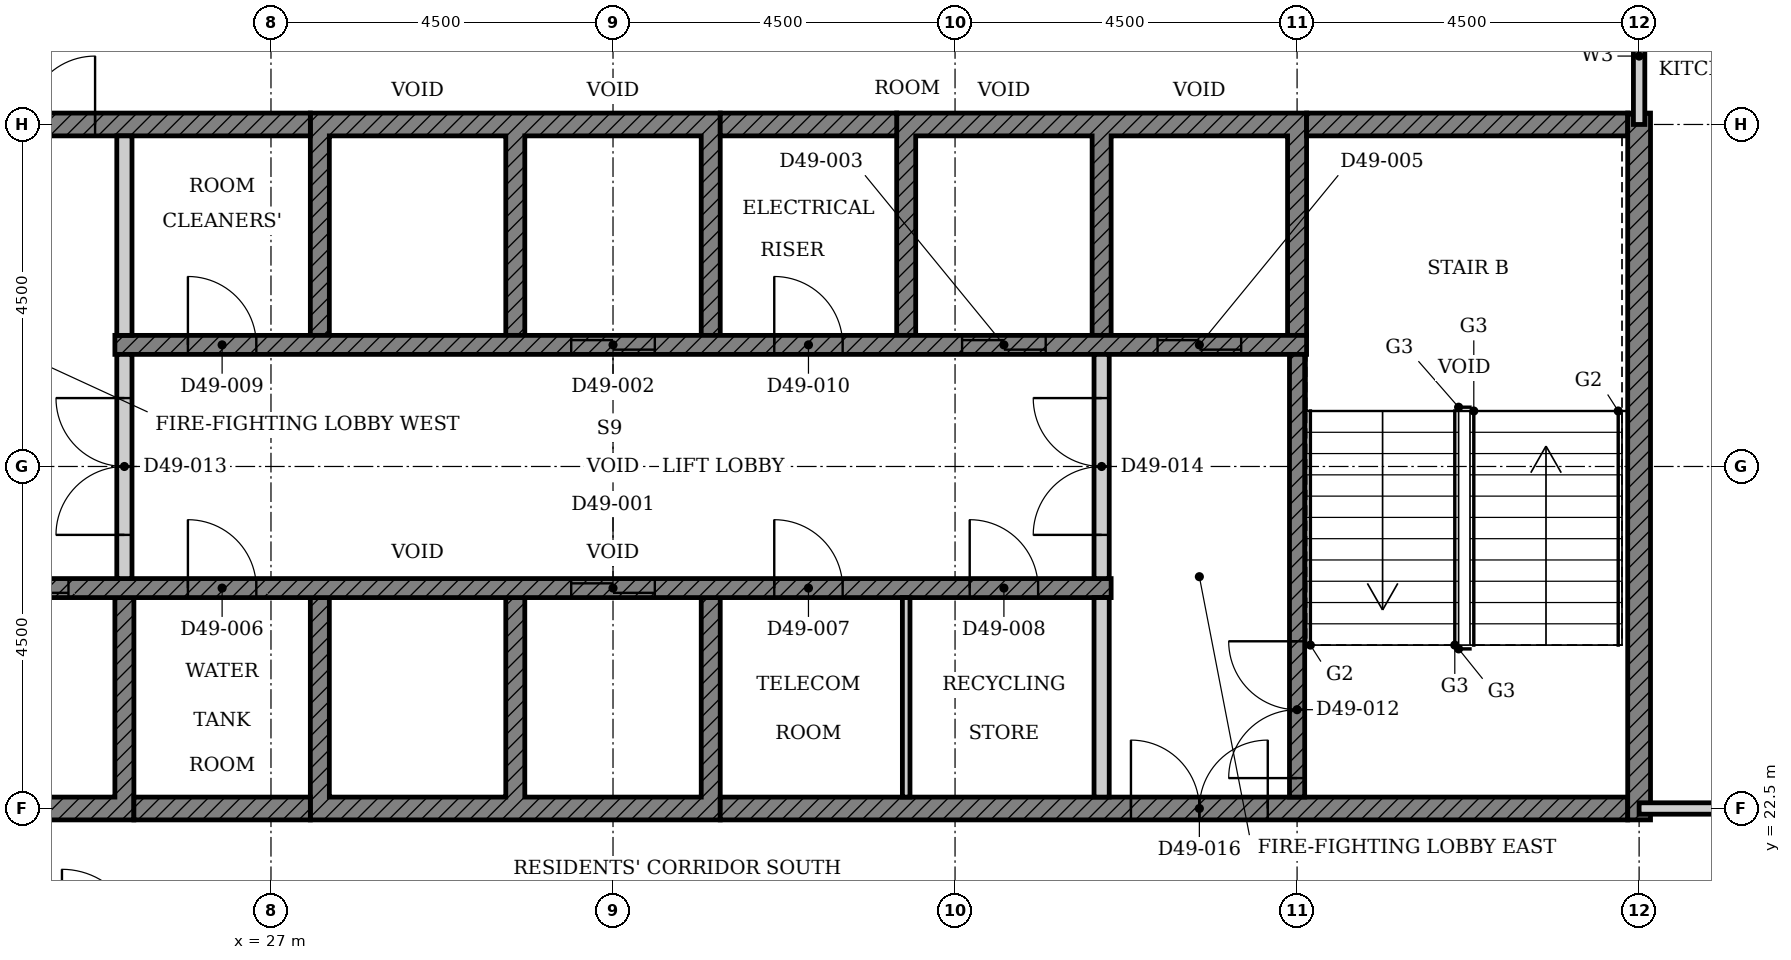
"""IFC4 building model, lengths in metres.
Left out: names, types, materials, properties, quantities, classifications, styles, units other than length and angle.
Written with IfcOpenShell. Run it as: python <this file> out.ifc"""

import sys

from ifc_helpers import new_model, si_unit, direction, frame, frame_2d, origin, place, context, subcontext, project, spatial, polyline, rectangle, outline, extrude, element, fill, save


model = new_model("IFC4")
c1 = context("Model", 3, precision=1e-05, world=origin(), true_north=direction((0.0, 1.0)))
c2 = subcontext(c1, "Body", "Model", "MODEL_VIEW")
j1 = project(units=[si_unit("LENGTHUNIT", "METRE"), si_unit("PLANEANGLEUNIT", "RADIAN")], contexts=[c1])
p1 = place(None, origin())
s1 = spatial("IfcSite", under=j1, at=p1, CompositionType="ELEMENT")
p2 = place(p1, origin())
s2 = spatial("IfcBuilding", under=s1, at=p2, CompositionType="ELEMENT")
p3 = place(p2, frame((0.0, 0.0, 196.1)))
s3 = spatial("IfcBuildingStorey", under=s2, at=p3, CompositionType="ELEMENT", Elevation=196.1)
p4 = place(p3, origin())
e1 = element("IfcWall", 1, at=p4, inside=s3, PredefinedType="SHEAR", context=c2, shape_type="SweptSolid", body=[
    extrude(outline(polyline([(22.375, 22.35), (25.197, 22.35), (25.197, 25.275), (24.947, 25.275), (24.947, 22.65), (22.625, 22.65), (22.625, 25.275), (22.375, 25.275), (22.375, 22.35)])), origin(), (0.0, 0.0, 1.0), 3.4),
])
p5 = place(p3, origin())
e2 = element("IfcWall", 2, at=p5, inside=s3, PredefinedType="SHEAR", context=c2, shape_type="SweptSolid", body=[
    extrude(outline(polyline([(27.518, 22.35), (32.911, 22.35), (32.911, 25.275), (32.661, 25.275), (32.661, 22.65), (30.339, 22.65), (30.339, 25.275), (30.089, 25.275), (30.089, 22.65), (27.768, 22.65), (27.768, 25.275), (27.518, 25.275), (27.518, 22.35)])), origin(), (0.0, 0.0, 1.0), 3.4),
])
p6 = place(p3, origin())
e3 = element("IfcWall", 3, at=p6, inside=s3, PredefinedType="SHEAR", context=c2, shape_type="SweptSolid", body=[
    extrude(outline(polyline([(27.518, 28.725), (27.768, 28.725), (27.768, 31.35), (30.089, 31.35), (30.089, 28.725), (30.339, 28.725), (30.339, 31.35), (32.661, 31.35), (32.661, 28.725), (32.911, 28.725), (32.911, 31.65), (27.518, 31.65), (27.518, 28.725)])), origin(), (0.0, 0.0, 1.0), 3.4),
])
p7 = place(p3, origin())
e4 = element("IfcWall", 4, at=p7, inside=s3, PredefinedType="SHEAR", context=c2, shape_type="SweptSolid", body=[
    extrude(outline(polyline([(35.232, 28.725), (35.482, 28.725), (35.482, 31.35), (37.803, 31.35), (37.803, 28.725), (38.053, 28.725), (38.053, 31.35), (40.375, 31.35), (40.375, 28.725), (40.625, 28.725), (40.625, 31.65), (35.232, 31.65), (35.232, 28.725)])), origin(), (0.0, 0.0, 1.0), 3.4),
])
p8 = place(p3, frame((25.197, 22.5, 0.0), z_axis=(0.0, 0.0, 1.0), x_axis=(1.0, 0.0, 0.0)))
e5 = element("IfcWall", 5, at=p8, inside=s3, PredefinedType="SHEAR", context=c2, shape_type="SweptSolid", body=[
    extrude(rectangle(XDim=2.321, YDim=0.3, at=frame_2d((1.161, 0.0))), origin(), (0.0, 0.0, 1.0), 3.4),
])
p9 = place(p3, frame((32.911, 22.5, 0.0), z_axis=(0.0, 0.0, 1.0), x_axis=(1.0, 0.0, 0.0)))
e6 = element("IfcWall", 6, at=p9, inside=s3, PredefinedType="SHEAR", context=c2, shape_type="SweptSolid", body=[
    extrude(rectangle(XDim=11.939, YDim=0.3, at=frame_2d((5.97, 0.0))), origin(), (0.0, 0.0, 1.0), 3.4),
])
p10 = place(p9, frame((5.404, 0.0, 0.0)))
e7 = element("IfcOpeningElement", 7, at=p10, cuts=e6, PredefinedType="OPENING", context=c2, shape_type="SweptSolid", body=[
    extrude(rectangle(XDim=1.8, YDim=2.1, at=frame_2d((0.9, 1.05))), frame((0.0, 0.16, 0.0), z_axis=(0.0, -1.0, 0.0), x_axis=(1.0, 0.0, 0.0)), (0.0, 0.0, 1.0), 0.32),
])
p11 = place(p3, frame((18.15, 31.5, 0.0), z_axis=(0.0, 0.0, 1.0), x_axis=(1.0, 0.0, 0.0)))
e8 = element("IfcWall", 8, at=p11, inside=s3, PredefinedType="SHEAR", context=c2, shape_type="SweptSolid", body=[
    extrude(rectangle(XDim=9.368, YDim=0.3, at=frame_2d((4.684, 0.0))), origin(), (0.0, 0.0, 1.0), 3.4),
])
p12 = place(p11, frame((4.736, 0.0, 0.0)))
e9 = element("IfcOpeningElement", 9, at=p12, cuts=e8, PredefinedType="OPENING", context=c2, shape_type="SweptSolid", body=[
    extrude(rectangle(XDim=1.8, YDim=2.1, at=frame_2d((0.9, 1.05))), frame((0.0, 0.16, 0.0), z_axis=(0.0, -1.0, 0.0), x_axis=(1.0, 0.0, 0.0)), (0.0, 0.0, 1.0), 0.32),
])
p13 = place(p3, frame((32.911, 31.5, 0.0), z_axis=(0.0, 0.0, 1.0), x_axis=(1.0, 0.0, 0.0)))
e10 = element("IfcWall", 10, at=p13, inside=s3, PredefinedType="SHEAR", context=c2, shape_type="SweptSolid", body=[
    extrude(rectangle(XDim=2.322, YDim=0.3, at=frame_2d((1.161, 0.0))), origin(), (0.0, 0.0, 1.0), 3.4),
])
p14 = place(p3, frame((40.625, 31.5, 0.0), z_axis=(0.0, 0.0, 1.0), x_axis=(1.0, 0.0, 0.0)))
e11 = element("IfcWall", 11, at=p14, inside=s3, PredefinedType="SHEAR", context=c2, shape_type="SweptSolid", body=[
    extrude(rectangle(XDim=4.225, YDim=0.3, at=frame_2d((2.113, 0.0))), origin(), (0.0, 0.0, 1.0), 3.4),
])
p15 = place(p3, frame((45.0, 22.35, 0.0), z_axis=(0.0, 0.0, 1.0), x_axis=(0.0, 1.0, 0.0)))
e12 = element("IfcWall", 12, at=p15, inside=s3, PredefinedType="SHEAR", context=c2, shape_type="SweptSolid", body=[
    extrude(rectangle(XDim=9.3, YDim=0.3, at=frame_2d((4.65, 0.0))), origin(), (0.0, 0.0, 1.0), 3.4),
])
p16 = place(p3, frame((22.375, 25.4, 0.0), z_axis=(0.0, 0.0, 1.0), x_axis=(1.0, 0.0, 0.0)))
e13 = element("IfcWall", 13, at=p16, inside=s3, PredefinedType="SHEAR", context=c2, shape_type="SweptSolid", body=[
    extrude(rectangle(XDim=15.678, YDim=0.25, at=frame_2d((7.839, 0.0))), origin(), (0.0, 0.0, 1.0), 3.4),
])
p17 = place(p16, frame((8.575, 0.0, 0.0)))
e14 = element("IfcOpeningElement", 14, at=p17, cuts=e13, PredefinedType="OPENING", context=c2, shape_type="SweptSolid", body=[
    extrude(rectangle(XDim=1.1, YDim=2.1, at=frame_2d((0.55, 1.05))), frame((0.0, 0.135, 0.0), z_axis=(0.0, -1.0, 0.0), x_axis=(1.0, 0.0, 0.0)), (0.0, 0.0, 1.0), 0.27),
])
p18 = place(p16, frame((0.861, 0.0, 0.0)))
e15 = element("IfcOpeningElement", 15, at=p18, cuts=e13, PredefinedType="OPENING", context=c2, shape_type="SweptSolid", body=[
    extrude(rectangle(XDim=1.1, YDim=2.1, at=frame_2d((0.55, 1.05))), frame((0.0, 0.135, 0.0), z_axis=(0.0, -1.0, 0.0), x_axis=(1.0, 0.0, 0.0)), (0.0, 0.0, 1.0), 0.27),
])
p19 = place(p16, frame((3.532, 0.0, 0.0)))
e16 = element("IfcOpeningElement", 16, at=p19, cuts=e13, PredefinedType="OPENING", context=c2, shape_type="SweptSolid", body=[
    extrude(rectangle(XDim=0.9, YDim=2.1, at=frame_2d((0.45, 1.05))), frame((0.0, 0.135, 0.0), z_axis=(0.0, -1.0, 0.0), x_axis=(1.0, 0.0, 0.0)), (0.0, 0.0, 1.0), 0.27),
])
p20 = place(p16, frame((11.246, 0.0, 0.0)))
e17 = element("IfcOpeningElement", 17, at=p20, cuts=e13, PredefinedType="OPENING", context=c2, shape_type="SweptSolid", body=[
    extrude(rectangle(XDim=0.9, YDim=2.1, at=frame_2d((0.45, 1.05))), frame((0.0, 0.135, 0.0), z_axis=(0.0, -1.0, 0.0), x_axis=(1.0, 0.0, 0.0)), (0.0, 0.0, 1.0), 0.27),
])
p21 = place(p16, frame((13.818, 0.0, 0.0)))
e18 = element("IfcOpeningElement", 18, at=p21, cuts=e13, PredefinedType="OPENING", context=c2, shape_type="SweptSolid", body=[
    extrude(rectangle(XDim=0.9, YDim=2.1, at=frame_2d((0.45, 1.05))), frame((0.0, 0.135, 0.0), z_axis=(0.0, -1.0, 0.0), x_axis=(1.0, 0.0, 0.0)), (0.0, 0.0, 1.0), 0.27),
])
p22 = place(p3, frame((24.947, 28.6, 0.0), z_axis=(0.0, 0.0, 1.0), x_axis=(1.0, 0.0, 0.0)))
e19 = element("IfcWall", 19, at=p22, inside=s3, PredefinedType="SHEAR", context=c2, shape_type="SweptSolid", body=[
    extrude(rectangle(XDim=15.678, YDim=0.25, at=frame_2d((7.839, 0.0))), origin(), (0.0, 0.0, 1.0), 3.4),
])
p23 = place(p22, frame((6.004, 0.0, 0.0)))
e20 = element("IfcOpeningElement", 20, at=p23, cuts=e19, PredefinedType="OPENING", context=c2, shape_type="SweptSolid", body=[
    extrude(rectangle(XDim=1.1, YDim=2.1, at=frame_2d((0.55, 1.05))), frame((0.0, 0.135, 0.0), z_axis=(0.0, -1.0, 0.0), x_axis=(1.0, 0.0, 0.0)), (0.0, 0.0, 1.0), 0.27),
])
p24 = place(p22, frame((11.146, 0.0, 0.0)))
e21 = element("IfcOpeningElement", 21, at=p24, cuts=e19, PredefinedType="OPENING", context=c2, shape_type="SweptSolid", body=[
    extrude(rectangle(XDim=1.1, YDim=2.1, at=frame_2d((0.55, 1.05))), frame((0.0, 0.135, 0.0), z_axis=(0.0, -1.0, 0.0), x_axis=(1.0, 0.0, 0.0)), (0.0, 0.0, 1.0), 0.27),
])
p25 = place(p22, frame((13.718, 0.0, 0.0)))
e22 = element("IfcOpeningElement", 22, at=p25, cuts=e19, PredefinedType="OPENING", context=c2, shape_type="SweptSolid", body=[
    extrude(rectangle(XDim=1.1, YDim=2.1, at=frame_2d((0.55, 1.05))), frame((0.0, 0.135, 0.0), z_axis=(0.0, -1.0, 0.0), x_axis=(1.0, 0.0, 0.0)), (0.0, 0.0, 1.0), 0.27),
])
p26 = place(p22, frame((0.961, 0.0, 0.0)))
e23 = element("IfcOpeningElement", 23, at=p26, cuts=e19, PredefinedType="OPENING", context=c2, shape_type="SweptSolid", body=[
    extrude(rectangle(XDim=0.9, YDim=2.1, at=frame_2d((0.45, 1.05))), frame((0.0, 0.135, 0.0), z_axis=(0.0, -1.0, 0.0), x_axis=(1.0, 0.0, 0.0)), (0.0, 0.0, 1.0), 0.27),
])
p27 = place(p22, frame((8.675, 0.0, 0.0)))
e24 = element("IfcOpeningElement", 24, at=p27, cuts=e19, PredefinedType="OPENING", context=c2, shape_type="SweptSolid", body=[
    extrude(rectangle(XDim=0.9, YDim=2.1, at=frame_2d((0.45, 1.05))), frame((0.0, 0.135, 0.0), z_axis=(0.0, -1.0, 0.0), x_axis=(1.0, 0.0, 0.0)), (0.0, 0.0, 1.0), 0.27),
])
p28 = place(p3, frame((37.928, 22.65, 0.0), z_axis=(0.0, 0.0, 1.0), x_axis=(0.0, 1.0, 0.0)))
e25 = element("IfcWall", 25, at=p28, inside=s3, PredefinedType="PARTITIONING", context=c2, shape_type="SweptSolid", body=[
    extrude(rectangle(XDim=2.625, YDim=0.2, at=frame_2d((1.312, 0.0))), origin(), (0.0, 0.0, 1.0), 3.4),
])
p29 = place(p3, frame((35.357, 22.65, 0.0), z_axis=(0.0, 0.0, 1.0), x_axis=(0.0, 1.0, 0.0)))
e26 = element("IfcWall", 26, at=p29, inside=s3, PredefinedType="PARTITIONING", context=c2, shape_type="SweptSolid", body=[
    extrude(rectangle(XDim=2.625, YDim=0.1, at=frame_2d((1.312, 0.0))), origin(), (0.0, 0.0, 1.0), 3.4),
])
p30 = place(p3, frame((25.072, 28.725, 0.0), z_axis=(0.0, 0.0, 1.0), x_axis=(0.0, 1.0, 0.0)))
e27 = element("IfcWall", 27, at=p30, inside=s3, PredefinedType="PARTITIONING", context=c2, shape_type="SweptSolid", body=[
    extrude(rectangle(XDim=2.625, YDim=0.2, at=frame_2d((1.312, 0.0))), origin(), (0.0, 0.0, 1.0), 3.4),
])
p31 = place(p3, frame((40.5, 22.65, 0.0), z_axis=(0.0, 0.0, 1.0), x_axis=(0.0, 1.0, 0.0)))
e28 = element("IfcWall", 28, at=p31, inside=s3, PredefinedType="SHEAR", context=c2, shape_type="SweptSolid", body=[
    extrude(rectangle(XDim=5.825, YDim=0.2, at=frame_2d((2.913, 0.0))), origin(), (0.0, 0.0, 1.0), 3.4),
])
p32 = place(p31, frame((0.25, 0.0, 0.0)))
e29 = element("IfcOpeningElement", 29, at=p32, cuts=e28, PredefinedType="OPENING", context=c2, shape_type="SweptSolid", body=[
    extrude(rectangle(XDim=1.8, YDim=2.1, at=frame_2d((0.9, 1.05))), frame((0.0, 0.11, 0.0), z_axis=(0.0, -1.0, 0.0), x_axis=(1.0, 0.0, 0.0)), (0.0, 0.0, 1.0), 0.22),
])
p33 = place(p3, frame((25.072, 25.525, 0.0), z_axis=(0.0, 0.0, 1.0), x_axis=(0.0, 1.0, 0.0)))
e30 = element("IfcWall", 30, at=p33, inside=s3, PredefinedType="PARTITIONING", context=c2, shape_type="SweptSolid", body=[
    extrude(rectangle(XDim=2.95, YDim=0.2, at=frame_2d((1.475, 0.0))), origin(), (0.0, 0.0, 1.0), 3.4),
])
p34 = place(p33, frame((0.575, 0.0, 0.0)))
e31 = element("IfcOpeningElement", 31, at=p34, cuts=e30, PredefinedType="OPENING", context=c2, shape_type="SweptSolid", body=[
    extrude(rectangle(XDim=1.8, YDim=2.1, at=frame_2d((0.9, 1.05))), frame((0.0, 0.11, 0.0), z_axis=(0.0, -1.0, 0.0), x_axis=(1.0, 0.0, 0.0)), (0.0, 0.0, 1.0), 0.22),
])
p35 = place(p3, frame((37.928, 25.525, 0.0), z_axis=(0.0, 0.0, 1.0), x_axis=(0.0, 1.0, 0.0)))
e32 = element("IfcWall", 32, at=p35, inside=s3, PredefinedType="PARTITIONING", context=c2, shape_type="SweptSolid", body=[
    extrude(rectangle(XDim=2.95, YDim=0.2, at=frame_2d((1.475, 0.0))), origin(), (0.0, 0.0, 1.0), 3.4),
])
p36 = place(p35, frame((0.575, 0.0, 0.0)))
e33 = element("IfcOpeningElement", 33, at=p36, cuts=e32, PredefinedType="OPENING", context=c2, shape_type="SweptSolid", body=[
    extrude(rectangle(XDim=1.8, YDim=2.1, at=frame_2d((0.9, 1.05))), frame((0.0, 0.11, 0.0), z_axis=(0.0, -1.0, 0.0), x_axis=(1.0, 0.0, 0.0)), (0.0, 0.0, 1.0), 0.22),
])
p37 = place(p3, frame((45.0, 22.5, 0.0), z_axis=(0.0, 0.0, 1.0), x_axis=(1.0, 0.0, 0.0)))
e34 = element("IfcWall", 34, at=p37, inside=s3, PredefinedType="PARTITIONING", context=c2, shape_type="SweptSolid", body=[
    extrude(rectangle(XDim=4.79, YDim=0.15, at=frame_2d((2.395, 0.0))), origin(), (0.0, 0.0, 1.0), 3.4),
])
p38 = place(p37, frame((1.75, 0.0, 0.0)))
e35 = element("IfcOpeningElement", 35, at=p38, cuts=e34, PredefinedType="OPENING", context=c2, shape_type="SweptSolid", body=[
    extrude(rectangle(XDim=1.0, YDim=2.2, at=frame_2d((0.5, 1.1))), frame((0.0, 0.085, 0.0), z_axis=(0.0, -1.0, 0.0), x_axis=(1.0, 0.0, 0.0)), (0.0, 0.0, 1.0), 0.17),
])
p39 = place(p3, frame((45.0, 31.5, 0.0), z_axis=(0.0, 0.0, 1.0), x_axis=(0.0, 1.0, 0.0)))
e36 = element("IfcWall", 36, at=p39, inside=s3, PredefinedType="PARTITIONING", context=c2, shape_type="SweptSolid", body=[
    extrude(rectangle(XDim=1.8, YDim=0.15, at=frame_2d((0.9, 0.0))), origin(), (0.0, 0.0, 1.0), 3.4),
])
p40 = place(p17, origin())
e37 = element("IfcDoor", 37, at=p40, inside=s3, OperationType="DOUBLE_DOOR_SLIDING", PredefinedType="DOOR", context=c2, shape_type="SweptSolid", body=[
    extrude(rectangle(XDim=1.1, YDim=2.1, at=frame_2d((0.55, 1.05))), frame((0.0, 0.025, 0.0), z_axis=(0.0, -1.0, 0.0), x_axis=(1.0, 0.0, 0.0)), (0.0, 0.0, 1.0), 0.05),
])
fill(e14, e37)
p41 = place(p23, origin())
e38 = element("IfcDoor", 38, at=p41, inside=s3, OperationType="DOUBLE_DOOR_SLIDING", PredefinedType="DOOR", context=c2, shape_type="SweptSolid", body=[
    extrude(rectangle(XDim=1.1, YDim=2.1, at=frame_2d((0.55, 1.05))), frame((0.0, 0.025, 0.0), z_axis=(0.0, -1.0, 0.0), x_axis=(1.0, 0.0, 0.0)), (0.0, 0.0, 1.0), 0.05),
])
fill(e20, e38)
p42 = place(p24, origin())
e39 = element("IfcDoor", 39, at=p42, inside=s3, OperationType="DOUBLE_DOOR_SLIDING", PredefinedType="DOOR", context=c2, shape_type="SweptSolid", body=[
    extrude(rectangle(XDim=1.1, YDim=2.1, at=frame_2d((0.55, 1.05))), frame((0.0, 0.025, 0.0), z_axis=(0.0, -1.0, 0.0), x_axis=(1.0, 0.0, 0.0)), (0.0, 0.0, 1.0), 0.05),
])
fill(e21, e39)
p43 = place(p18, origin())
e40 = element("IfcDoor", 40, at=p43, inside=s3, OperationType="DOUBLE_DOOR_SLIDING", PredefinedType="DOOR", context=c2, shape_type="SweptSolid", body=[
    extrude(rectangle(XDim=1.1, YDim=2.1, at=frame_2d((0.55, 1.05))), frame((0.0, 0.025, 0.0), z_axis=(0.0, -1.0, 0.0), x_axis=(1.0, 0.0, 0.0)), (0.0, 0.0, 1.0), 0.05),
])
fill(e15, e40)
p44 = place(p25, origin())
e41 = element("IfcDoor", 41, at=p44, inside=s3, OperationType="DOUBLE_DOOR_SLIDING", PredefinedType="DOOR", context=c2, shape_type="SweptSolid", body=[
    extrude(rectangle(XDim=1.1, YDim=2.1, at=frame_2d((0.55, 1.05))), frame((0.0, 0.025, 0.0), z_axis=(0.0, -1.0, 0.0), x_axis=(1.0, 0.0, 0.0)), (0.0, 0.0, 1.0), 0.05),
])
fill(e22, e41)
p45 = place(p19, origin())
e42 = element("IfcDoor", 42, at=p45, inside=s3, OperationType="SINGLE_SWING_LEFT", PredefinedType="DOOR", context=c2, shape_type="SweptSolid", body=[
    extrude(rectangle(XDim=0.9, YDim=2.1, at=frame_2d((0.45, 1.05))), frame((0.0, 0.025, 0.0), z_axis=(0.0, -1.0, 0.0), x_axis=(1.0, 0.0, 0.0)), (0.0, 0.0, 1.0), 0.05),
])
fill(e16, e42)
p46 = place(p20, origin())
e43 = element("IfcDoor", 43, at=p46, inside=s3, OperationType="SINGLE_SWING_LEFT", PredefinedType="DOOR", context=c2, shape_type="SweptSolid", body=[
    extrude(rectangle(XDim=0.9, YDim=2.1, at=frame_2d((0.45, 1.05))), frame((0.0, 0.025, 0.0), z_axis=(0.0, -1.0, 0.0), x_axis=(1.0, 0.0, 0.0)), (0.0, 0.0, 1.0), 0.05),
])
fill(e17, e43)
p47 = place(p21, origin())
e44 = element("IfcDoor", 44, at=p47, inside=s3, OperationType="SINGLE_SWING_LEFT", PredefinedType="DOOR", context=c2, shape_type="SweptSolid", body=[
    extrude(rectangle(XDim=0.9, YDim=2.1, at=frame_2d((0.45, 1.05))), frame((0.0, 0.025, 0.0), z_axis=(0.0, -1.0, 0.0), x_axis=(1.0, 0.0, 0.0)), (0.0, 0.0, 1.0), 0.05),
])
fill(e18, e44)
p48 = place(p26, origin())
e45 = element("IfcDoor", 45, at=p48, inside=s3, OperationType="SINGLE_SWING_LEFT", PredefinedType="DOOR", context=c2, shape_type="SweptSolid", body=[
    extrude(rectangle(XDim=0.9, YDim=2.1, at=frame_2d((0.45, 1.05))), frame((0.0, 0.025, 0.0), z_axis=(0.0, -1.0, 0.0), x_axis=(1.0, 0.0, 0.0)), (0.0, 0.0, 1.0), 0.05),
])
fill(e23, e45)
p49 = place(p27, origin())
e46 = element("IfcDoor", 46, at=p49, inside=s3, OperationType="SINGLE_SWING_LEFT", PredefinedType="DOOR", context=c2, shape_type="SweptSolid", body=[
    extrude(rectangle(XDim=0.9, YDim=2.1, at=frame_2d((0.45, 1.05))), frame((0.0, 0.025, 0.0), z_axis=(0.0, -1.0, 0.0), x_axis=(1.0, 0.0, 0.0)), (0.0, 0.0, 1.0), 0.05),
])
fill(e24, e46)
p50 = place(p32, origin())
e47 = element("IfcDoor", 47, at=p50, inside=s3, OperationType="DOUBLE_DOOR_SINGLE_SWING", PredefinedType="DOOR", context=c2, shape_type="SweptSolid", body=[
    extrude(rectangle(XDim=1.8, YDim=2.1, at=frame_2d((0.9, 1.05))), frame((0.0, 0.025, 0.0), z_axis=(0.0, -1.0, 0.0), x_axis=(1.0, 0.0, 0.0)), (0.0, 0.0, 1.0), 0.05),
])
fill(e29, e47)
p51 = place(p34, origin())
e48 = element("IfcDoor", 48, at=p51, inside=s3, OperationType="DOUBLE_DOOR_SINGLE_SWING", PredefinedType="DOOR", context=c2, shape_type="SweptSolid", body=[
    extrude(rectangle(XDim=1.8, YDim=2.1, at=frame_2d((0.9, 1.05))), frame((0.0, 0.025, 0.0), z_axis=(0.0, -1.0, 0.0), x_axis=(1.0, 0.0, 0.0)), (0.0, 0.0, 1.0), 0.05),
])
fill(e31, e48)
p52 = place(p36, origin())
e49 = element("IfcDoor", 49, at=p52, inside=s3, OperationType="DOUBLE_DOOR_SINGLE_SWING", PredefinedType="DOOR", context=c2, shape_type="SweptSolid", body=[
    extrude(rectangle(XDim=1.8, YDim=2.1, at=frame_2d((0.9, 1.05))), frame((0.0, 0.025, 0.0), z_axis=(0.0, -1.0, 0.0), x_axis=(1.0, 0.0, 0.0)), (0.0, 0.0, 1.0), 0.05),
])
fill(e33, e49)
p53 = place(p12, origin())
e50 = element("IfcDoor", 50, at=p53, inside=s3, OperationType="DOUBLE_DOOR_SINGLE_SWING", PredefinedType="DOOR", context=c2, shape_type="SweptSolid", body=[
    extrude(rectangle(XDim=1.8, YDim=2.1, at=frame_2d((0.9, 1.05))), frame((0.0, 0.025, 0.0), z_axis=(0.0, -1.0, 0.0), x_axis=(1.0, 0.0, 0.0)), (0.0, 0.0, 1.0), 0.05),
])
fill(e9, e50)
p54 = place(p10, origin())
e51 = element("IfcDoor", 51, at=p54, inside=s3, OperationType="DOUBLE_DOOR_SINGLE_SWING", PredefinedType="DOOR", context=c2, shape_type="SweptSolid", body=[
    extrude(rectangle(XDim=1.8, YDim=2.1, at=frame_2d((0.9, 1.05))), frame((0.0, 0.025, 0.0), z_axis=(0.0, -1.0, 0.0), x_axis=(1.0, 0.0, 0.0)), (0.0, 0.0, 1.0), 0.05),
])
fill(e7, e51)
save(model, sys.argv[1])
